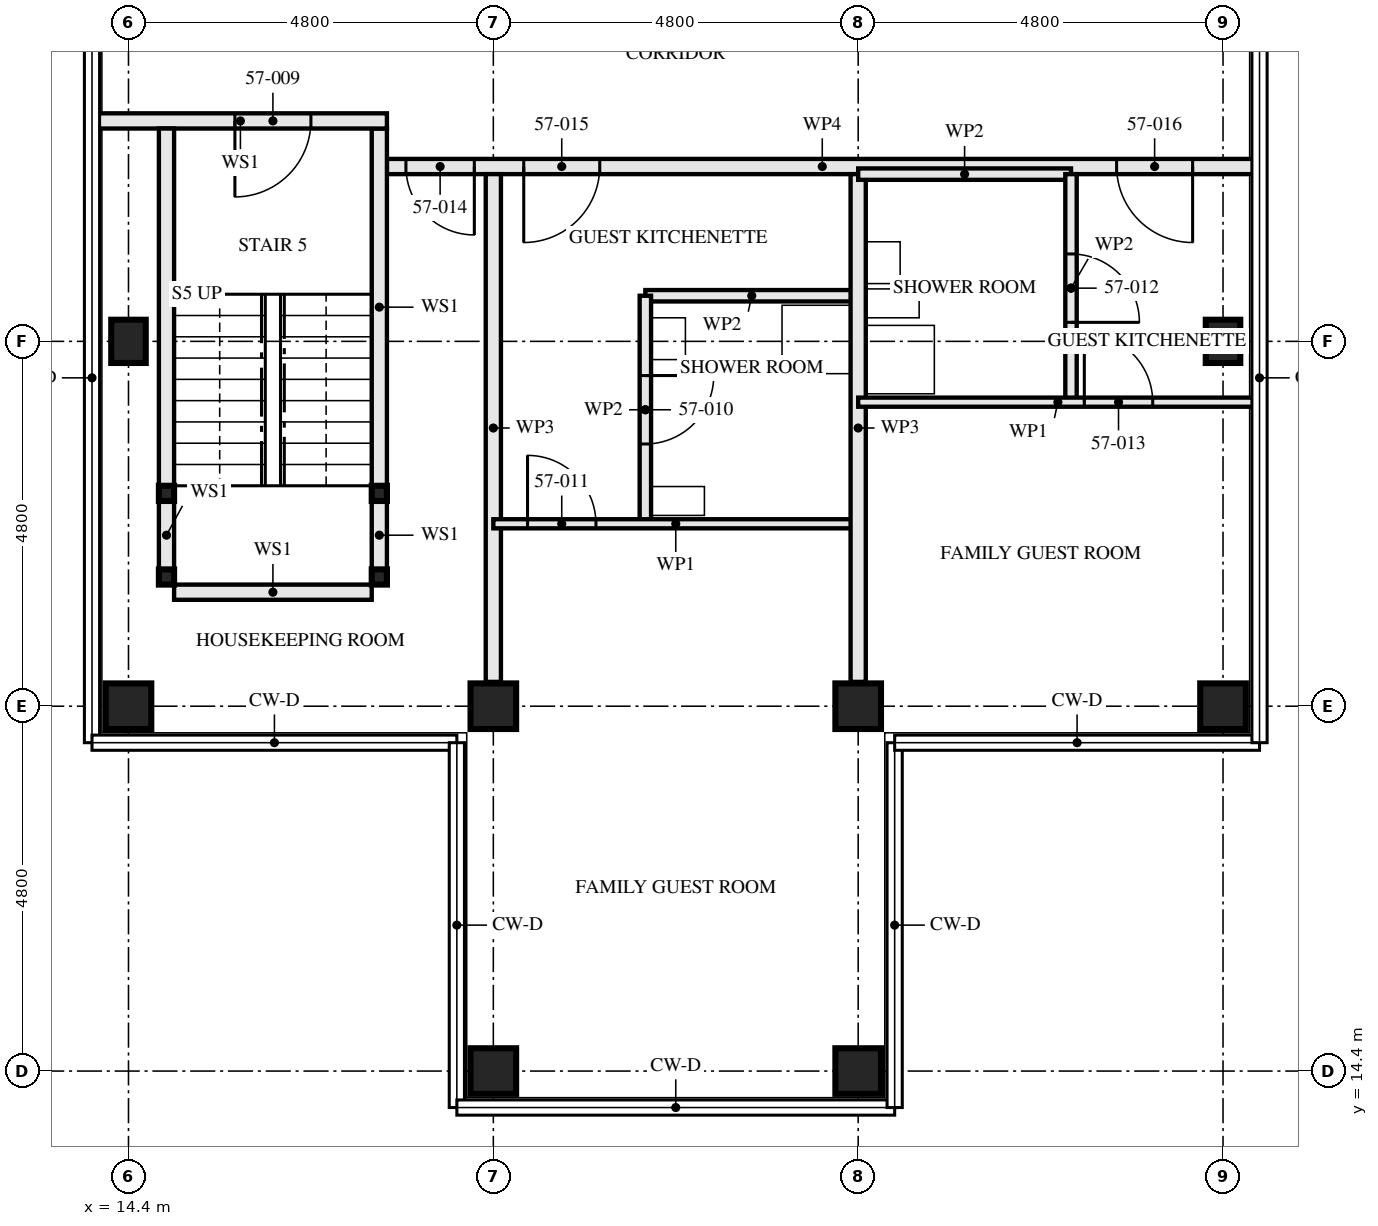
"""IFC4 building model, lengths in metres.
Left out: names, types, materials, properties, quantities, classifications, styles, units other than length and angle.
Written with IfcOpenShell. Run it as: python <this file> out.ifc"""

import sys

from ifc_helpers import new_model, si_unit, direction, frame, frame_2d, origin, origin_2d, place, context, subcontext, project, spatial, rectangle, hollow_rectangle, i_section, extrude, element, fill, save


model = new_model("IFC4")
c1 = context("Model", 3, precision=1e-05, world=origin(), true_north=direction((0.0, 1.0)))
c2 = subcontext(c1, "Body", "Model", "MODEL_VIEW")
j1 = project(units=[si_unit("LENGTHUNIT", "METRE"), si_unit("PLANEANGLEUNIT", "RADIAN")], contexts=[c1])
p1 = place(None, origin())
s1 = spatial("IfcSite", under=j1, at=p1, CompositionType="ELEMENT")
p2 = place(p1, origin())
s2 = spatial("IfcBuilding", under=s1, at=p2, CompositionType="ELEMENT")
p3 = place(p2, frame((0.0, 0.0, 208.5)))
s3 = spatial("IfcBuildingStorey", under=s2, at=p3, CompositionType="ELEMENT", Elevation=208.5)
p4 = place(p3, frame((14.4, 19.2, 0.0), z_axis=(0.0, 0.0, 1.0), x_axis=(0.0, 1.0, 0.0)))
e1 = element("IfcColumn", 1, at=p4, inside=s3, PredefinedType="COLUMN", context=c2, shape_type="SweptSolid", body=[
    extrude(hollow_rectangle(XDim=0.6, YDim=0.6, WallThickness=0.05, at=origin_2d()), origin(), (0.0, 0.0, 1.0), 3.5),
])
p5 = place(p3, frame((14.4, 24.0, 0.0), z_axis=(0.0, 0.0, 1.0), x_axis=(1.0, 0.0, 0.0)))
e2 = element("IfcColumn", 2, at=p5, inside=s3, PredefinedType="COLUMN", context=c2, shape_type="SweptSolid", body=[
    extrude(i_section(OverallWidth=0.454, OverallDepth=0.569, WebThickness=0.078, FlangeThickness=0.125, FilletRadius=0.015, at=origin_2d()), origin(), (0.0, 0.0, 1.0), 3.5),
])
for number, where, z_axis, x_axis in (
    (3, (19.2, 14.4, 0.0), (0.0, 0.0, 1.0), (0.0, 1.0, 0.0)),
    (4, (19.2, 19.2, 0.0), (0.0, 0.0, 1.0), (0.0, 1.0, 0.0)),
    (5, (24.0, 14.4, 0.0), (0.0, 0.0, 1.0), (0.0, 1.0, 0.0)),
    (6, (24.0, 19.2, 0.0), (0.0, 0.0, 1.0), (0.0, 1.0, 0.0)),
    (7, (28.8, 19.2, 0.0), (0.0, 0.0, 1.0), (0.0, 1.0, 0.0)),
):
    element("IfcColumn", number, at=place(p3, frame(where, z_axis=z_axis, x_axis=x_axis)), inside=s3, PredefinedType="COLUMN", context=c2, shape_type="SweptSolid", body=[
        extrude(hollow_rectangle(XDim=0.6, YDim=0.6, WallThickness=0.05, at=origin_2d()), origin(), (0.0, 0.0, 1.0), 3.5),
    ])
p6 = place(p3, frame((28.8, 24.0, 0.0), z_axis=(0.0, 0.0, 1.0), x_axis=(1.0, 0.0, 0.0)))
e8 = element("IfcColumn", 8, at=p6, inside=s3, PredefinedType="COLUMN", context=c2, shape_type="SweptSolid", body=[
    extrude(i_section(OverallWidth=0.454, OverallDepth=0.569, WebThickness=0.078, FlangeThickness=0.125, FilletRadius=0.015, at=origin_2d()), origin(), (0.0, 0.0, 1.0), 3.5),
])
for number, where, z_axis, x_axis in (
    (9, (14.9, 20.9, 0.0), (0.0, 0.0, 1.0), (1.0, 0.0, 0.0)),
    (10, (17.7, 20.9, 0.0), (0.0, 0.0, 1.0), (1.0, 0.0, 0.0)),
    (11, (14.9, 22.0, 0.0), (0.0, 0.0, 1.0), (1.0, 0.0, 0.0)),
    (12, (17.7, 22.0, 0.0), (0.0, 0.0, 1.0), (1.0, 0.0, 0.0)),
):
    element("IfcColumn", number, at=place(p3, frame(where, z_axis=z_axis, x_axis=x_axis)), inside=s3, PredefinedType="COLUMN", context=c2, shape_type="SweptSolid", body=[
        extrude(hollow_rectangle(XDim=0.2, YDim=0.2, WallThickness=0.008, at=origin_2d()), origin(), (0.0, 0.0, 1.0), 3.33),
    ])
p7 = place(p3, frame((14.9, 21.0, 0.0), z_axis=(0.0, 0.0, 1.0), x_axis=(0.0, 1.0, 0.0)))
e13 = element("IfcWall", 13, at=p7, inside=s3, PredefinedType="SOLIDWALL", context=c2, shape_type="SweptSolid", body=[
    extrude(rectangle(XDim=0.9, YDim=0.2, at=frame_2d((0.45, 0.0))), origin(), (0.0, 0.0, 1.0), 2.99),
])
p8 = place(p3, frame((14.9, 22.1, 0.0), z_axis=(0.0, 0.0, 1.0), x_axis=(0.0, 1.0, 0.0)))
e14 = element("IfcWall", 14, at=p8, inside=s3, PredefinedType="SOLIDWALL", context=c2, shape_type="SweptSolid", body=[
    extrude(rectangle(XDim=4.7, YDim=0.2, at=frame_2d((2.35, 0.0))), origin(), (0.0, 0.0, 1.0), 2.99),
])
p9 = place(p3, frame((17.7, 21.0, 0.0), z_axis=(0.0, 0.0, 1.0), x_axis=(0.0, 1.0, 0.0)))
e15 = element("IfcWall", 15, at=p9, inside=s3, PredefinedType="SOLIDWALL", context=c2, shape_type="SweptSolid", body=[
    extrude(rectangle(XDim=0.9, YDim=0.2, at=frame_2d((0.45, 0.0))), origin(), (0.0, 0.0, 1.0), 2.99),
])
p10 = place(p3, frame((17.7, 22.1, 0.0), z_axis=(0.0, 0.0, 1.0), x_axis=(0.0, 1.0, 0.0)))
e16 = element("IfcWall", 16, at=p10, inside=s3, PredefinedType="SOLIDWALL", context=c2, shape_type="SweptSolid", body=[
    extrude(rectangle(XDim=4.7, YDim=0.2, at=frame_2d((2.35, 0.0))), origin(), (0.0, 0.0, 1.0), 2.99),
])
p11 = place(p3, frame((15.0, 20.7, 0.0), z_axis=(0.0, 0.0, 1.0), x_axis=(1.0, 0.0, 0.0)))
e17 = element("IfcWall", 17, at=p11, inside=s3, PredefinedType="SOLIDWALL", context=c2, shape_type="SweptSolid", body=[
    extrude(rectangle(XDim=2.6, YDim=0.2, at=frame_2d((1.3, 0.0))), origin(), (0.0, 0.0, 1.0), 3.33),
])
p12 = place(p3, frame((13.945, 26.9, 0.0), z_axis=(0.0, 0.0, 1.0), x_axis=(1.0, 0.0, 0.0)))
e18 = element("IfcWall", 18, at=p12, inside=s3, PredefinedType="SOLIDWALL", context=c2, shape_type="SweptSolid", body=[
    extrude(rectangle(XDim=3.855, YDim=0.2, at=frame_2d((1.927, 0.0))), origin(), (0.0, 0.0, 1.0), 2.32),
])
p13 = place(p12, frame((1.855, 0.0, 0.0)))
e19 = element("IfcOpeningElement", 19, at=p13, cuts=e18, PredefinedType="OPENING", context=c2, shape_type="SweptSolid", body=[
    extrude(rectangle(XDim=1.0, YDim=2.1, at=frame_2d((0.5, 1.05))), frame((0.0, 0.111, 0.0), z_axis=(0.0, -1.0, 0.0), x_axis=(1.0, 0.0, 0.0)), (0.0, 0.0, 1.0), 0.221),
])
p14 = place(p3, frame((19.2, 19.52, 0.0), z_axis=(0.0, 0.0, 1.0), x_axis=(0.0, 1.0, 0.0)))
e20 = element("IfcWall", 20, at=p14, inside=s3, PredefinedType="PARTITIONING", context=c2, shape_type="SweptSolid", body=[
    extrude(rectangle(XDim=6.68, YDim=0.2, at=frame_2d((3.34, 0.0))), origin(), (0.0, 0.0, 1.0), 2.55),
])
p15 = place(p3, frame((21.2, 21.6, 0.0), z_axis=(0.0, 0.0, 1.0), x_axis=(0.0, 1.0, 0.0)))
e21 = element("IfcWall", 21, at=p15, inside=s3, PredefinedType="PARTITIONING", context=c2, shape_type="SweptSolid", body=[
    extrude(rectangle(XDim=3.0, YDim=0.15, at=frame_2d((1.5, 0.0))), origin(), (0.0, 0.0, 1.0), 2.55),
])
p16 = place(p15, frame((1.05, 0.0, 0.0)))
e22 = element("IfcOpeningElement", 22, at=p16, cuts=e21, PredefinedType="OPENING", context=c2, shape_type="SweptSolid", body=[
    extrude(rectangle(XDim=0.9, YDim=2.1, at=frame_2d((0.45, 1.05))), frame((0.0, 0.085, 0.0), z_axis=(0.0, -1.0, 0.0), x_axis=(1.0, 0.0, 0.0)), (0.0, 0.0, 1.0), 0.171),
])
p17 = place(p3, frame((21.2, 24.6, 0.0), z_axis=(0.0, 0.0, 1.0), x_axis=(1.0, 0.0, 0.0)))
e23 = element("IfcWall", 23, at=p17, inside=s3, PredefinedType="PARTITIONING", context=c2, shape_type="SweptSolid", body=[
    extrude(rectangle(XDim=2.8, YDim=0.15, at=frame_2d((1.4, 0.0))), origin(), (0.0, 0.0, 1.0), 3.33),
])
p18 = place(p3, frame((19.2, 21.6, 0.0), z_axis=(0.0, 0.0, 1.0), x_axis=(1.0, 0.0, 0.0)))
e24 = element("IfcWall", 24, at=p18, inside=s3, PredefinedType="PARTITIONING", context=c2, shape_type="SweptSolid", body=[
    extrude(rectangle(XDim=4.8, YDim=0.12, at=frame_2d((2.4, 0.0))), origin(), (0.0, 0.0, 1.0), 3.33),
])
p19 = place(p18, frame((0.45, 0.0, 0.0)))
e25 = element("IfcOpeningElement", 25, at=p19, cuts=e24, PredefinedType="OPENING", context=c2, shape_type="SweptSolid", body=[
    extrude(rectangle(XDim=0.9, YDim=2.1, at=frame_2d((0.45, 1.05))), frame((0.0, 0.071, 0.0), z_axis=(0.0, -1.0, 0.0), x_axis=(1.0, 0.0, 0.0)), (0.0, 0.0, 1.0), 0.141),
])
p20 = place(p3, frame((24.0, 19.52, 0.0), z_axis=(0.0, 0.0, 1.0), x_axis=(0.0, 1.0, 0.0)))
e26 = element("IfcWall", 26, at=p20, inside=s3, PredefinedType="PARTITIONING", context=c2, shape_type="SweptSolid", body=[
    extrude(rectangle(XDim=6.68, YDim=0.2, at=frame_2d((3.34, 0.0))), origin(), (0.0, 0.0, 1.0), 2.55),
])
p21 = place(p3, frame((26.8, 23.2, 0.0), z_axis=(0.0, 0.0, 1.0), x_axis=(0.0, 1.0, 0.0)))
e27 = element("IfcWall", 27, at=p21, inside=s3, PredefinedType="PARTITIONING", context=c2, shape_type="SweptSolid", body=[
    extrude(rectangle(XDim=3.0, YDim=0.15, at=frame_2d((1.5, 0.0))), origin(), (0.0, 0.0, 1.0), 2.55),
])
p22 = place(p21, frame((1.05, 0.0, 0.0)))
e28 = element("IfcOpeningElement", 28, at=p22, cuts=e27, PredefinedType="OPENING", context=c2, shape_type="SweptSolid", body=[
    extrude(rectangle(XDim=0.9, YDim=2.1, at=frame_2d((0.45, 1.05))), frame((0.0, 0.085, 0.0), z_axis=(0.0, -1.0, 0.0), x_axis=(1.0, 0.0, 0.0)), (0.0, 0.0, 1.0), 0.171),
])
p23 = place(p3, frame((24.0, 26.2, 0.0), z_axis=(0.0, 0.0, 1.0), x_axis=(1.0, 0.0, 0.0)))
e29 = element("IfcWall", 29, at=p23, inside=s3, PredefinedType="PARTITIONING", context=c2, shape_type="SweptSolid", body=[
    extrude(rectangle(XDim=2.8, YDim=0.15, at=frame_2d((1.4, 0.0))), origin(), (0.0, 0.0, 1.0), 3.33),
])
p24 = place(p3, frame((24.0, 23.2, 0.0), z_axis=(0.0, 0.0, 1.0), x_axis=(1.0, 0.0, 0.0)))
e30 = element("IfcWall", 30, at=p24, inside=s3, PredefinedType="PARTITIONING", context=c2, shape_type="SweptSolid", body=[
    extrude(rectangle(XDim=5.255, YDim=0.12, at=frame_2d((2.627, 0.0))), origin(), (0.0, 0.0, 1.0), 2.32),
])
p25 = place(p24, frame((2.975, 0.0, 0.0)))
e31 = element("IfcOpeningElement", 31, at=p25, cuts=e30, PredefinedType="OPENING", context=c2, shape_type="SweptSolid", body=[
    extrude(rectangle(XDim=0.9, YDim=2.1, at=frame_2d((0.45, 1.05))), frame((0.0, 0.071, 0.0), z_axis=(0.0, -1.0, 0.0), x_axis=(1.0, 0.0, 0.0)), (0.0, 0.0, 1.0), 0.141),
])
p26 = place(p3, frame((17.8, 26.3, 0.0), z_axis=(0.0, 0.0, 1.0), x_axis=(1.0, 0.0, 0.0)))
e32 = element("IfcWall", 32, at=p26, inside=s3, PredefinedType="PARTITIONING", context=c2, shape_type="SweptSolid", body=[
    extrude(rectangle(XDim=11.455, YDim=0.2, at=frame_2d((5.728, 0.0))), origin(), (0.0, 0.0, 1.0), 2.32),
])
p27 = place(p26, frame((0.25, 0.0, 0.0)))
e33 = element("IfcOpeningElement", 33, at=p27, cuts=e32, PredefinedType="OPENING", context=c2, shape_type="SweptSolid", body=[
    extrude(rectangle(XDim=0.9, YDim=2.1, at=frame_2d((0.45, 1.05))), frame((0.0, 0.111, 0.0), z_axis=(0.0, -1.0, 0.0), x_axis=(1.0, 0.0, 0.0)), (0.0, 0.0, 1.0), 0.221),
])
p28 = place(p26, frame((1.8, 0.0, 0.0)))
e34 = element("IfcOpeningElement", 34, at=p28, cuts=e32, PredefinedType="OPENING", context=c2, shape_type="SweptSolid", body=[
    extrude(rectangle(XDim=1.0, YDim=2.1, at=frame_2d((0.5, 1.05))), frame((0.0, 0.111, 0.0), z_axis=(0.0, -1.0, 0.0), x_axis=(1.0, 0.0, 0.0)), (0.0, 0.0, 1.0), 0.221),
])
p29 = place(p26, frame((9.6, 0.0, 0.0)))
e35 = element("IfcOpeningElement", 35, at=p29, cuts=e32, PredefinedType="OPENING", context=c2, shape_type="SweptSolid", body=[
    extrude(rectangle(XDim=1.0, YDim=2.1, at=frame_2d((0.5, 1.05))), frame((0.0, 0.111, 0.0), z_axis=(0.0, -1.0, 0.0), x_axis=(1.0, 0.0, 0.0)), (0.0, 0.0, 1.0), 0.221),
])
p30 = place(p13, frame((1.0, 0.0, 0.0), z_axis=(0.0, 0.0, 1.0), x_axis=(-1.0, 0.0, 0.0)))
e36 = element("IfcDoor", 36, at=p30, inside=s3, OperationType="SINGLE_SWING_LEFT", PredefinedType="DOOR", context=c2, shape_type="SweptSolid", body=[
    extrude(rectangle(XDim=1.0, YDim=2.1, at=frame_2d((0.5, 1.05))), frame((0.0, 0.032, 0.0), z_axis=(0.0, -1.0, 0.0), x_axis=(1.0, 0.0, 0.0)), (0.0, 0.0, 1.0), 0.064),
])
fill(e19, e36)
p31 = place(p16, frame((0.9, 0.0, 0.0), z_axis=(0.0, 0.0, 1.0), x_axis=(-1.0, 0.0, 0.0)))
e37 = element("IfcDoor", 37, at=p31, inside=s3, OperationType="SINGLE_SWING_RIGHT", PredefinedType="DOOR", context=c2, shape_type="SweptSolid", body=[
    extrude(rectangle(XDim=0.9, YDim=2.1, at=frame_2d((0.45, 1.05))), frame((0.0, 0.022, 0.0), z_axis=(0.0, -1.0, 0.0), x_axis=(1.0, 0.0, 0.0)), (0.0, 0.0, 1.0), 0.044),
])
fill(e22, e37)
p32 = place(p19, origin())
e38 = element("IfcDoor", 38, at=p32, inside=s3, OperationType="SINGLE_SWING_RIGHT", PredefinedType="DOOR", context=c2, shape_type="SweptSolid", body=[
    extrude(rectangle(XDim=0.9, YDim=2.1, at=frame_2d((0.45, 1.05))), frame((0.0, 0.022, 0.0), z_axis=(0.0, -1.0, 0.0), x_axis=(1.0, 0.0, 0.0)), (0.0, 0.0, 1.0), 0.044),
])
fill(e25, e38)
p33 = place(p22, frame((0.9, 0.0, 0.0), z_axis=(0.0, 0.0, 1.0), x_axis=(-1.0, 0.0, 0.0)))
e39 = element("IfcDoor", 39, at=p33, inside=s3, OperationType="SINGLE_SWING_LEFT", PredefinedType="DOOR", context=c2, shape_type="SweptSolid", body=[
    extrude(rectangle(XDim=0.9, YDim=2.1, at=frame_2d((0.45, 1.05))), frame((0.0, 0.022, 0.0), z_axis=(0.0, -1.0, 0.0), x_axis=(1.0, 0.0, 0.0)), (0.0, 0.0, 1.0), 0.044),
])
fill(e28, e39)
p34 = place(p25, origin())
e40 = element("IfcDoor", 40, at=p34, inside=s3, OperationType="SINGLE_SWING_RIGHT", PredefinedType="DOOR", context=c2, shape_type="SweptSolid", body=[
    extrude(rectangle(XDim=0.9, YDim=2.1, at=frame_2d((0.45, 1.05))), frame((0.0, 0.022, 0.0), z_axis=(0.0, -1.0, 0.0), x_axis=(1.0, 0.0, 0.0)), (0.0, 0.0, 1.0), 0.044),
])
fill(e31, e40)
p35 = place(p27, frame((0.9, 0.0, 0.0), z_axis=(0.0, 0.0, 1.0), x_axis=(-1.0, 0.0, 0.0)))
e41 = element("IfcDoor", 41, at=p35, inside=s3, OperationType="SINGLE_SWING_RIGHT", PredefinedType="DOOR", context=c2, shape_type="SweptSolid", body=[
    extrude(rectangle(XDim=0.9, YDim=2.1, at=frame_2d((0.45, 1.05))), frame((0.0, 0.027, 0.0), z_axis=(0.0, -1.0, 0.0), x_axis=(1.0, 0.0, 0.0)), (0.0, 0.0, 1.0), 0.054),
])
fill(e33, e41)
p36 = place(p28, frame((1.0, 0.0, 0.0), z_axis=(0.0, 0.0, 1.0), x_axis=(-1.0, 0.0, 0.0)))
e42 = element("IfcDoor", 42, at=p36, inside=s3, OperationType="SINGLE_SWING_LEFT", PredefinedType="DOOR", context=c2, shape_type="SweptSolid", body=[
    extrude(rectangle(XDim=1.0, YDim=2.1, at=frame_2d((0.5, 1.05))), frame((0.0, 0.027, 0.0), z_axis=(0.0, -1.0, 0.0), x_axis=(1.0, 0.0, 0.0)), (0.0, 0.0, 1.0), 0.054),
])
fill(e34, e42)
p37 = place(p29, frame((1.0, 0.0, 0.0), z_axis=(0.0, 0.0, 1.0), x_axis=(-1.0, 0.0, 0.0)))
e43 = element("IfcDoor", 43, at=p37, inside=s3, OperationType="SINGLE_SWING_RIGHT", PredefinedType="DOOR", context=c2, shape_type="SweptSolid", body=[
    extrude(rectangle(XDim=1.0, YDim=2.1, at=frame_2d((0.5, 1.05))), frame((0.0, 0.027, 0.0), z_axis=(0.0, -1.0, 0.0), x_axis=(1.0, 0.0, 0.0)), (0.0, 0.0, 1.0), 0.054),
])
fill(e35, e43)
save(model, sys.argv[1])
